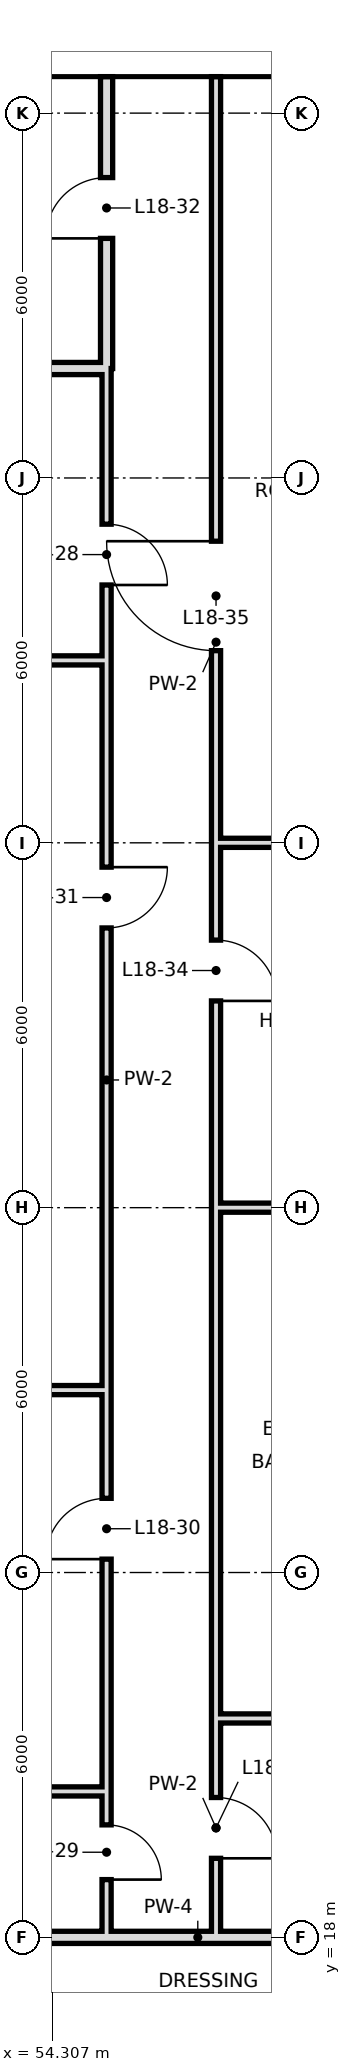
"""IFC4 building model, lengths in metres.
Left out: names, types, materials, properties, quantities, classifications, styles, units other than length and angle.
Written with IfcOpenShell. Run it as: python <this file> out.ifc"""

import sys

from ifc_helpers import new_model, si_unit, direction, frame, frame_2d, origin, place, context, subcontext, project, spatial, rectangle, extrude, element, fill, save


model = new_model("IFC4")
c1 = context("Model", 3, precision=1e-05, world=origin(), true_north=direction((0.0, 1.0)))
c2 = subcontext(c1, "Body", "Model", "MODEL_VIEW")
j1 = project(units=[si_unit("LENGTHUNIT", "METRE"), si_unit("PLANEANGLEUNIT", "RADIAN")], contexts=[c1])
p1 = place(None, origin())
s1 = spatial("IfcSite", under=j1, at=p1, CompositionType="ELEMENT")
p2 = place(p1, origin())
s2 = spatial("IfcBuilding", under=s1, at=p2, CompositionType="ELEMENT")
p3 = place(p2, frame((0.0, 0.0, 85.8)))
s3 = spatial("IfcBuildingStorey", under=s2, at=p3, CompositionType="ELEMENT", Elevation=85.8)
p4 = place(p3, frame((55.2, 43.8, 0.0), z_axis=(0.0, 0.0, 1.0), x_axis=(0.0, 1.0, 0.0)))
e1 = element("IfcWall", 1, at=p4, inside=s3, PredefinedType="SOLIDWALL", context=c2, shape_type="SweptSolid", body=[
    extrude(rectangle(XDim=4.8, YDim=0.2, at=frame_2d((2.4, 0.0))), origin(), (0.0, 0.0, 1.0), 4.1),
])
p5 = place(p4, frame((2.14, 0.0, 0.0)))
e2 = element("IfcOpeningElement", 2, at=p5, cuts=e1, PredefinedType="OPENING", context=c2, shape_type="SweptSolid", body=[
    extrude(rectangle(XDim=1.0, YDim=2.4, at=frame_2d((0.5, 1.2))), frame((0.0, 0.11, 0.0), z_axis=(0.0, -1.0, 0.0), x_axis=(1.0, 0.0, 0.0)), (0.0, 0.0, 1.0), 0.22),
])
p6 = place(p3, frame((55.2, 20.4, 0.0), z_axis=(0.0, 0.0, 1.0), x_axis=(0.0, 1.0, 0.0)))
e3 = element("IfcWall", 3, at=p6, inside=s3, PredefinedType="PARTITIONING", context=c2, shape_type="SweptSolid", body=[
    extrude(rectangle(XDim=23.4, YDim=0.15, at=frame_2d((11.7, 0.0))), origin(), (0.0, 0.0, 1.0), 4.1),
])
p7 = place(p6, frame((19.84, 0.0, 0.0)))
e4 = element("IfcOpeningElement", 4, at=p7, cuts=e3, PredefinedType="OPENING", context=c2, shape_type="SweptSolid", body=[
    extrude(rectangle(XDim=1.0, YDim=2.4, at=frame_2d((0.5, 1.2))), frame((0.0, 0.085, 0.0), z_axis=(0.0, -1.0, 0.0), x_axis=(1.0, 0.0, 0.0)), (0.0, 0.0, 1.0), 0.17),
])
p8 = place(p6, frame((3.82, 0.0, 0.0)))
e5 = element("IfcOpeningElement", 5, at=p8, cuts=e3, PredefinedType="OPENING", context=c2, shape_type="SweptSolid", body=[
    extrude(rectangle(XDim=1.0, YDim=2.4, at=frame_2d((0.5, 1.2))), frame((0.0, 0.085, 0.0), z_axis=(0.0, -1.0, 0.0), x_axis=(1.0, 0.0, 0.0)), (0.0, 0.0, 1.0), 0.17),
])
p9 = place(p6, frame((14.2, 0.0, 0.0)))
e6 = element("IfcOpeningElement", 6, at=p9, cuts=e3, PredefinedType="OPENING", context=c2, shape_type="SweptSolid", body=[
    extrude(rectangle(XDim=1.0, YDim=2.4, at=frame_2d((0.5, 1.2))), frame((0.0, 0.085, 0.0), z_axis=(0.0, -1.0, 0.0), x_axis=(1.0, 0.0, 0.0)), (0.0, 0.0, 1.0), 0.17),
])
p10 = place(p3, frame((55.2, 18.0, 0.0), z_axis=(0.0, 0.0, 1.0), x_axis=(0.0, 1.0, 0.0)))
e7 = element("IfcWall", 7, at=p10, inside=s3, PredefinedType="PARTITIONING", context=c2, shape_type="SweptSolid", body=[
    extrude(rectangle(XDim=2.4, YDim=0.15, at=frame_2d((1.2, 0.0))), origin(), (0.0, 0.0, 1.0), 4.1),
])
p11 = place(p10, frame((0.95, 0.0, 0.0)))
e8 = element("IfcOpeningElement", 8, at=p11, cuts=e7, PredefinedType="OPENING", context=c2, shape_type="SweptSolid", body=[
    extrude(rectangle(XDim=0.9, YDim=2.4, at=frame_2d((0.45, 1.2))), frame((0.0, 0.085, 0.0), z_axis=(0.0, -1.0, 0.0), x_axis=(1.0, 0.0, 0.0)), (0.0, 0.0, 1.0), 0.17),
])
p12 = place(p3, frame((57.0, 18.0, 0.0), z_axis=(0.0, 0.0, 1.0), x_axis=(0.0, 1.0, 0.0)))
e9 = element("IfcWall", 9, at=p12, inside=s3, PredefinedType="PARTITIONING", context=c2, shape_type="SweptSolid", body=[
    extrude(rectangle(XDim=3.6, YDim=0.15, at=frame_2d((1.8, 0.0))), origin(), (0.0, 0.0, 1.0), 4.1),
])
p13 = place(p12, frame((1.3, 0.0, 0.0)))
e10 = element("IfcOpeningElement", 10, at=p13, cuts=e9, PredefinedType="OPENING", context=c2, shape_type="SweptSolid", body=[
    extrude(rectangle(XDim=1.0, YDim=2.4, at=frame_2d((0.5, 1.2))), frame((0.0, 0.085, 0.0), z_axis=(0.0, -1.0, 0.0), x_axis=(1.0, 0.0, 0.0)), (0.0, 0.0, 1.0), 0.17),
])
p14 = place(p3, frame((57.0, 30.0, 0.0), z_axis=(0.0, 0.0, 1.0), x_axis=(0.0, 1.0, 0.0)))
e11 = element("IfcWall", 11, at=p14, inside=s3, PredefinedType="PARTITIONING", context=c2, shape_type="SweptSolid", body=[
    extrude(rectangle(XDim=18.6, YDim=0.15, at=frame_2d((9.3, 0.0))), origin(), (0.0, 0.0, 1.0), 4.1),
])
p15 = place(p14, frame((3.4, 0.0, 0.0)))
e12 = element("IfcOpeningElement", 12, at=p15, cuts=e11, PredefinedType="OPENING", context=c2, shape_type="SweptSolid", body=[
    extrude(rectangle(XDim=1.0, YDim=2.4, at=frame_2d((0.5, 1.2))), frame((0.0, 0.085, 0.0), z_axis=(0.0, -1.0, 0.0), x_axis=(1.0, 0.0, 0.0)), (0.0, 0.0, 1.0), 0.17),
])
p16 = place(p14, frame((9.16, 0.0, 0.0)))
e13 = element("IfcOpeningElement", 13, at=p16, cuts=e11, PredefinedType="OPENING", context=c2, shape_type="SweptSolid", body=[
    extrude(rectangle(XDim=1.8, YDim=2.4, at=frame_2d((0.9, 1.2))), frame((0.0, 0.085, 0.0), z_axis=(0.0, -1.0, 0.0), x_axis=(1.0, 0.0, 0.0)), (0.0, 0.0, 1.0), 0.17),
])
p17 = place(p3, frame((57.0, 21.6, 0.0), z_axis=(0.0, 0.0, 1.0), x_axis=(0.0, 1.0, 0.0)))
e14 = element("IfcWall", 14, at=p17, inside=s3, PredefinedType="PARTITIONING", context=c2, shape_type="SweptSolid", body=[
    extrude(rectangle(XDim=8.4, YDim=0.15, at=frame_2d((4.2, 0.0))), origin(), (0.0, 0.0, 1.0), 4.1),
])
p18 = place(p3, frame((46.8, 18.0, 0.0), z_axis=(0.0, 0.0, 1.0), x_axis=(1.0, 0.0, 0.0)))
e15 = element("IfcWall", 15, at=p18, inside=s3, PredefinedType="SOLIDWALL", context=c2, shape_type="SweptSolid", body=[
    extrude(rectangle(XDim=19.8, YDim=0.2, at=frame_2d((9.9, 0.0))), origin(), (0.0, 0.0, 1.0), 3.2),
])
p19 = place(p3, frame((44.9, 20.4, 0.0), z_axis=(0.0, 0.0, 1.0), x_axis=(1.0, 0.0, 0.0)))
e16 = element("IfcWall", 16, at=p19, inside=s3, PredefinedType="PARTITIONING", context=c2, shape_type="SweptSolid", body=[
    extrude(rectangle(XDim=10.3, YDim=0.15, at=frame_2d((5.15, 0.0))), origin(), (0.0, 0.0, 1.0), 4.1),
])
p20 = place(p3, frame((57.0, 21.6, 0.0), z_axis=(0.0, 0.0, 1.0), x_axis=(1.0, 0.0, 0.0)))
e17 = element("IfcWall", 17, at=p20, inside=s3, PredefinedType="PARTITIONING", context=c2, shape_type="SweptSolid", body=[
    extrude(rectangle(XDim=3.0, YDim=0.15, at=frame_2d((1.5, 0.0))), origin(), (0.0, 0.0, 1.0), 4.1),
])
p21 = place(p3, frame((44.9, 27.0, 0.0), z_axis=(0.0, 0.0, 1.0), x_axis=(1.0, 0.0, 0.0)))
e18 = element("IfcWall", 18, at=p21, inside=s3, PredefinedType="PARTITIONING", context=c2, shape_type="SweptSolid", body=[
    extrude(rectangle(XDim=10.3, YDim=0.15, at=frame_2d((5.15, 0.0))), origin(), (0.0, 0.0, 1.0), 4.1),
])
p22 = place(p3, frame((57.0, 30.0, 0.0), z_axis=(0.0, 0.0, 1.0), x_axis=(1.0, 0.0, 0.0)))
e19 = element("IfcWall", 19, at=p22, inside=s3, PredefinedType="PARTITIONING", context=c2, shape_type="SweptSolid", body=[
    extrude(rectangle(XDim=3.0, YDim=0.15, at=frame_2d((1.5, 0.0))), origin(), (0.0, 0.0, 1.0), 3.2),
])
p23 = place(p3, frame((57.0, 36.0, 0.0), z_axis=(0.0, 0.0, 1.0), x_axis=(1.0, 0.0, 0.0)))
e20 = element("IfcWall", 20, at=p23, inside=s3, PredefinedType="PARTITIONING", context=c2, shape_type="SweptSolid", body=[
    extrude(rectangle(XDim=9.0, YDim=0.15, at=frame_2d((4.5, 0.0))), origin(), (0.0, 0.0, 1.0), 3.2),
])
p24 = place(p3, frame((44.9, 39.0, 0.0), z_axis=(0.0, 0.0, 1.0), x_axis=(1.0, 0.0, 0.0)))
e21 = element("IfcWall", 21, at=p24, inside=s3, PredefinedType="PARTITIONING", context=c2, shape_type="SweptSolid", body=[
    extrude(rectangle(XDim=10.3, YDim=0.15, at=frame_2d((5.15, 0.0))), origin(), (0.0, 0.0, 1.0), 4.1),
])
p25 = place(p3, frame((44.9, 43.8, 0.0), z_axis=(0.0, 0.0, 1.0), x_axis=(1.0, 0.0, 0.0)))
e22 = element("IfcWall", 22, at=p25, inside=s3, PredefinedType="SOLIDWALL", context=c2, shape_type="SweptSolid", body=[
    extrude(rectangle(XDim=10.3, YDim=0.2, at=frame_2d((5.15, 0.0))), origin(), (0.0, 0.0, 1.0), 3.65),
])
p26 = place(p7, frame((1.0, 0.0, 0.0), z_axis=(0.0, 0.0, 1.0), x_axis=(-1.0, 0.0, 0.0)))
e23 = element("IfcDoor", 23, at=p26, inside=s3, OperationType="SINGLE_SWING_RIGHT", PredefinedType="DOOR", context=c2, shape_type="SweptSolid", body=[
    extrude(rectangle(XDim=1.0, YDim=2.4, at=frame_2d((0.5, 1.2))), frame((0.0, 0.025, 0.0), z_axis=(0.0, -1.0, 0.0), x_axis=(1.0, 0.0, 0.0)), (0.0, 0.0, 1.0), 0.05),
])
fill(e4, e23)
p27 = place(p11, frame((0.9, 0.0, 0.0), z_axis=(0.0, 0.0, 1.0), x_axis=(-1.0, 0.0, 0.0)))
e24 = element("IfcDoor", 24, at=p27, inside=s3, OperationType="SINGLE_SWING_RIGHT", PredefinedType="DOOR", context=c2, shape_type="SweptSolid", body=[
    extrude(rectangle(XDim=0.9, YDim=2.4, at=frame_2d((0.45, 1.2))), frame((0.0, 0.025, 0.0), z_axis=(0.0, -1.0, 0.0), x_axis=(1.0, 0.0, 0.0)), (0.0, 0.0, 1.0), 0.05),
])
fill(e8, e24)
p28 = place(p8, origin())
e25 = element("IfcDoor", 25, at=p28, inside=s3, OperationType="SINGLE_SWING_LEFT", PredefinedType="DOOR", context=c2, shape_type="SweptSolid", body=[
    extrude(rectangle(XDim=1.0, YDim=2.4, at=frame_2d((0.5, 1.2))), frame((0.0, 0.025, 0.0), z_axis=(0.0, -1.0, 0.0), x_axis=(1.0, 0.0, 0.0)), (0.0, 0.0, 1.0), 0.05),
])
fill(e5, e25)
p29 = place(p9, origin())
e26 = element("IfcDoor", 26, at=p29, inside=s3, OperationType="SINGLE_SWING_RIGHT", PredefinedType="DOOR", context=c2, shape_type="SweptSolid", body=[
    extrude(rectangle(XDim=1.0, YDim=2.4, at=frame_2d((0.5, 1.2))), frame((0.0, 0.025, 0.0), z_axis=(0.0, -1.0, 0.0), x_axis=(1.0, 0.0, 0.0)), (0.0, 0.0, 1.0), 0.05),
])
fill(e6, e26)
p30 = place(p5, origin())
e27 = element("IfcDoor", 27, at=p30, inside=s3, OperationType="SINGLE_SWING_LEFT", PredefinedType="DOOR", context=c2, shape_type="SweptSolid", body=[
    extrude(rectangle(XDim=1.0, YDim=2.4, at=frame_2d((0.5, 1.2))), frame((0.0, 0.025, 0.0), z_axis=(0.0, -1.0, 0.0), x_axis=(1.0, 0.0, 0.0)), (0.0, 0.0, 1.0), 0.05),
])
fill(e2, e27)
p31 = place(p13, frame((1.0, 0.0, 0.0), z_axis=(0.0, 0.0, 1.0), x_axis=(-1.0, 0.0, 0.0)))
e28 = element("IfcDoor", 28, at=p31, inside=s3, OperationType="SINGLE_SWING_RIGHT", PredefinedType="DOOR", context=c2, shape_type="SweptSolid", body=[
    extrude(rectangle(XDim=1.0, YDim=2.4, at=frame_2d((0.5, 1.2))), frame((0.0, 0.025, 0.0), z_axis=(0.0, -1.0, 0.0), x_axis=(1.0, 0.0, 0.0)), (0.0, 0.0, 1.0), 0.05),
])
fill(e10, e28)
p32 = place(p15, frame((1.0, 0.0, 0.0), z_axis=(0.0, 0.0, 1.0), x_axis=(-1.0, 0.0, 0.0)))
e29 = element("IfcDoor", 29, at=p32, inside=s3, OperationType="SINGLE_SWING_RIGHT", PredefinedType="DOOR", context=c2, shape_type="SweptSolid", body=[
    extrude(rectangle(XDim=1.0, YDim=2.4, at=frame_2d((0.5, 1.2))), frame((0.0, 0.025, 0.0), z_axis=(0.0, -1.0, 0.0), x_axis=(1.0, 0.0, 0.0)), (0.0, 0.0, 1.0), 0.05),
])
fill(e12, e29)
p33 = place(p16, frame((1.8, 0.0, 0.0), z_axis=(0.0, 0.0, 1.0), x_axis=(-1.0, 0.0, 0.0)))
e30 = element("IfcDoor", 30, at=p33, inside=s3, OperationType="SINGLE_SWING_LEFT", PredefinedType="DOOR", context=c2, shape_type="SweptSolid", body=[
    extrude(rectangle(XDim=1.8, YDim=2.4, at=frame_2d((0.9, 1.2))), frame((0.0, 0.025, 0.0), z_axis=(0.0, -1.0, 0.0), x_axis=(1.0, 0.0, 0.0)), (0.0, 0.0, 1.0), 0.05),
])
fill(e13, e30)
save(model, sys.argv[1])
